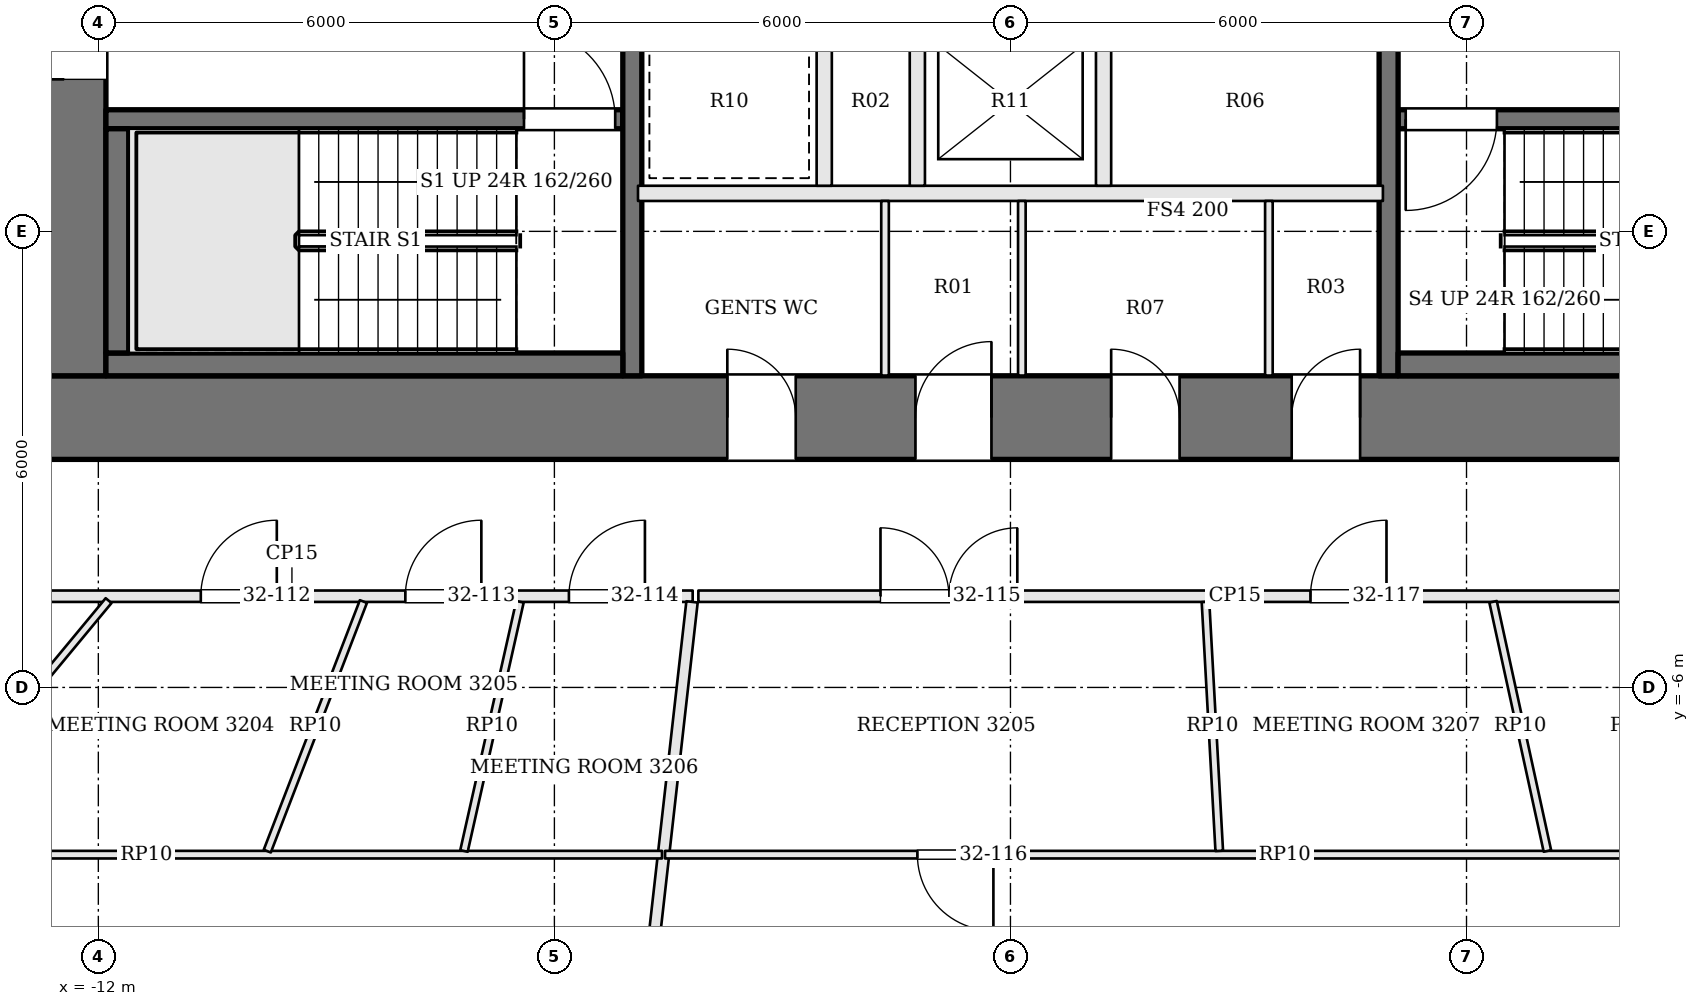
"""IFC4 building model, lengths in metres.
Left out: names, types, materials, properties, quantities, classifications, styles, units other than length and angle.
Written with IfcOpenShell. Run it as: python <this file> out.ifc"""

import sys

from ifc_helpers import new_model, si_unit, direction, frame, frame_2d, origin, place, context, subcontext, project, spatial, rectangle, extrude, element, fill, save


model = new_model("IFC4")
c1 = context("Model", 3, precision=1e-05, world=origin(), true_north=direction((0.0, 1.0)))
c2 = subcontext(c1, "Body", "Model", "MODEL_VIEW")
j1 = project(units=[si_unit("LENGTHUNIT", "METRE"), si_unit("PLANEANGLEUNIT", "RADIAN")], contexts=[c1])
p1 = place(None, origin())
s1 = spatial("IfcSite", under=j1, at=p1, CompositionType="ELEMENT")
p2 = place(p1, origin())
s2 = spatial("IfcBuilding", under=s1, at=p2, CompositionType="ELEMENT")
p3 = place(p2, frame((0.0, 0.0, 134.4)))
s3 = spatial("IfcBuildingStorey", under=s2, at=p3, CompositionType="ELEMENT", Elevation=134.4)
p4 = place(p3, frame((-13.0, -2.45, 0.0), z_axis=(0.0, 0.0, 1.0), x_axis=(1.0, 0.0, 0.0)))
e1 = element("IfcWall", 1, at=p4, inside=s3, PredefinedType="SHEAR", context=c2, shape_type="SweptSolid", body=[
    extrude(rectangle(XDim=26.0, YDim=1.1, at=frame_2d((13.0, 0.0))), origin(), (0.0, 0.0, 1.0), 3.9),
])
p5 = place(p4, frame((9.275, 0.0, 0.0)))
e2 = element("IfcOpeningElement", 2, at=p5, cuts=e1, PredefinedType="OPENING", context=c2, shape_type="SweptSolid", body=[
    extrude(rectangle(XDim=0.9, YDim=2.1, at=frame_2d((0.45, 1.05))), frame((0.0, 0.56, 0.0), z_axis=(0.0, -1.0, 0.0), x_axis=(1.0, 0.0, 0.0)), (0.0, 0.0, 1.0), 1.12),
])
p6 = place(p4, frame((11.75, 0.0, 0.0)))
e3 = element("IfcOpeningElement", 3, at=p6, cuts=e1, PredefinedType="OPENING", context=c2, shape_type="SweptSolid", body=[
    extrude(rectangle(XDim=1.0, YDim=2.1, at=frame_2d((0.5, 1.05))), frame((0.0, 0.56, 0.0), z_axis=(0.0, -1.0, 0.0), x_axis=(1.0, 0.0, 0.0)), (0.0, 0.0, 1.0), 1.12),
])
p7 = place(p4, frame((14.325, 0.0, 0.0)))
e4 = element("IfcOpeningElement", 4, at=p7, cuts=e1, PredefinedType="OPENING", context=c2, shape_type="SweptSolid", body=[
    extrude(rectangle(XDim=0.9, YDim=2.1, at=frame_2d((0.45, 1.05))), frame((0.0, 0.56, 0.0), z_axis=(0.0, -1.0, 0.0), x_axis=(1.0, 0.0, 0.0)), (0.0, 0.0, 1.0), 1.12),
])
p8 = place(p4, frame((16.7, 0.0, 0.0)))
e5 = element("IfcOpeningElement", 5, at=p8, cuts=e1, PredefinedType="OPENING", context=c2, shape_type="SweptSolid", body=[
    extrude(rectangle(XDim=0.9, YDim=2.1, at=frame_2d((0.45, 1.05))), frame((0.0, 0.56, 0.0), z_axis=(0.0, -1.0, 0.0), x_axis=(1.0, 0.0, 0.0)), (0.0, 0.0, 1.0), 1.12),
])
p9 = place(p3, frame((-12.45, -1.9, 0.0), z_axis=(0.0, 0.0, 1.0), x_axis=(0.0, 1.0, 0.0)))
e6 = element("IfcWall", 6, at=p9, inside=s3, PredefinedType="SHEAR", context=c2, shape_type="SweptSolid", body=[
    extrude(rectangle(XDim=12.8, YDim=1.1, at=frame_2d((6.4, 0.0))), origin(), (0.0, 0.0, 1.0), 3.9),
])
p10 = place(p9, frame((3.9, 0.0, 0.0)))
e7 = element("IfcOpeningElement", 7, at=p10, cuts=e6, PredefinedType="OPENING", context=c2, shape_type="SweptSolid", body=[
    extrude(rectangle(XDim=1.8, YDim=2.1, at=frame_2d((0.9, 1.05))), frame((0.0, 0.56, 0.0), z_axis=(0.0, -1.0, 0.0), x_axis=(1.0, 0.0, 0.0)), (0.0, 0.0, 1.0), 1.12),
])
p11 = place(p3, frame((-11.9, 1.475, 0.0), z_axis=(0.0, 0.0, 1.0), x_axis=(1.0, 0.0, 0.0)))
e8 = element("IfcWall", 8, at=p11, inside=s3, PredefinedType="SOLIDWALL", context=c2, shape_type="SweptSolid", body=[
    extrude(rectangle(XDim=6.8, YDim=0.25, at=frame_2d((3.4, 0.0))), origin(), (0.0, 0.0, 1.0), 3.7),
])
p12 = place(p11, frame((5.5, 0.0, 0.0)))
e9 = element("IfcOpeningElement", 9, at=p12, cuts=e8, PredefinedType="OPENING", context=c2, shape_type="SweptSolid", body=[
    extrude(rectangle(XDim=1.2, YDim=2.1, at=frame_2d((0.6, 1.05))), frame((0.0, 0.135, 0.0), z_axis=(0.0, -1.0, 0.0), x_axis=(1.0, 0.0, 0.0)), (0.0, 0.0, 1.0), 0.27),
])
p13 = place(p3, frame((11.9, 1.475, 0.0), z_axis=(0.0, 0.0, 1.0), x_axis=(-1.0, 0.0, 0.0)))
e10 = element("IfcWall", 10, at=p13, inside=s3, PredefinedType="SOLIDWALL", context=c2, shape_type="SweptSolid", body=[
    extrude(rectangle(XDim=6.8, YDim=0.25, at=frame_2d((3.4, 0.0))), origin(), (0.0, 0.0, 1.0), 3.7),
])
p14 = place(p13, frame((5.5, 0.0, 0.0)))
e11 = element("IfcOpeningElement", 11, at=p14, cuts=e10, PredefinedType="OPENING", context=c2, shape_type="SweptSolid", body=[
    extrude(rectangle(XDim=1.2, YDim=2.1, at=frame_2d((0.6, 1.05))), frame((0.0, 0.135, 0.0), z_axis=(0.0, -1.0, 0.0), x_axis=(1.0, 0.0, 0.0)), (0.0, 0.0, 1.0), 0.27),
])
p15 = place(p3, frame((-4.975, -1.9, 0.0), z_axis=(0.0, 0.0, 1.0), x_axis=(0.0, 1.0, 0.0)))
e12 = element("IfcWall", 12, at=p15, inside=s3, PredefinedType="SOLIDWALL", context=c2, shape_type="SweptSolid", body=[
    extrude(rectangle(XDim=12.8, YDim=0.25, at=frame_2d((6.4, 0.0))), origin(), (0.0, 0.0, 1.0), 3.7),
])
p16 = place(p15, frame((4.95, 0.0, 0.0)))
e13 = element("IfcOpeningElement", 13, at=p16, cuts=e12, PredefinedType="OPENING", context=c2, shape_type="SweptSolid", body=[
    extrude(rectangle(XDim=1.2, YDim=2.1, at=frame_2d((0.6, 1.05))), frame((0.0, 0.135, 0.0), z_axis=(0.0, -1.0, 0.0), x_axis=(1.0, 0.0, 0.0)), (0.0, 0.0, 1.0), 0.27),
])
p17 = place(p3, frame((4.975, 10.9, 0.0), z_axis=(0.0, 0.0, 1.0), x_axis=(0.0, -1.0, 0.0)))
e14 = element("IfcWall", 14, at=p17, inside=s3, PredefinedType="SOLIDWALL", context=c2, shape_type="SweptSolid", body=[
    extrude(rectangle(XDim=12.8, YDim=0.25, at=frame_2d((6.4, 0.0))), origin(), (0.0, 0.0, 1.0), 3.7),
])
p18 = place(p17, frame((4.95, 0.0, 0.0)))
e15 = element("IfcOpeningElement", 15, at=p18, cuts=e14, PredefinedType="OPENING", context=c2, shape_type="SweptSolid", body=[
    extrude(rectangle(XDim=1.2, YDim=2.1, at=frame_2d((0.6, 1.05))), frame((0.0, 0.135, 0.0), z_axis=(0.0, -1.0, 0.0), x_axis=(1.0, 0.0, 0.0)), (0.0, 0.0, 1.0), 0.27),
])
p19 = place(p3, frame((-11.9, -1.75, 0.0), z_axis=(0.0, 0.0, 1.0), x_axis=(1.0, 0.0, 0.0)))
e16 = element("IfcWall", 16, at=p19, inside=s3, PredefinedType="SOLIDWALL", context=c2, shape_type="SweptSolid", body=[
    extrude(rectangle(XDim=6.8, YDim=0.3, at=frame_2d((3.4, 0.0))), origin(), (0.0, 0.0, 1.0), 3.7),
])
p20 = place(p3, frame((-11.75, -1.6, 0.0), z_axis=(0.0, 0.0, 1.0), x_axis=(0.0, 1.0, 0.0)))
e17 = element("IfcWall", 17, at=p20, inside=s3, PredefinedType="SOLIDWALL", context=c2, shape_type="SweptSolid", body=[
    extrude(rectangle(XDim=2.95, YDim=0.3, at=frame_2d((1.475, 0.0))), origin(), (0.0, 0.0, 1.0), 3.7),
])
p21 = place(p3, frame((11.9, -1.75, 0.0), z_axis=(0.0, 0.0, 1.0), x_axis=(-1.0, 0.0, 0.0)))
e18 = element("IfcWall", 18, at=p21, inside=s3, PredefinedType="SOLIDWALL", context=c2, shape_type="SweptSolid", body=[
    extrude(rectangle(XDim=6.8, YDim=0.3, at=frame_2d((3.4, 0.0))), origin(), (0.0, 0.0, 1.0), 3.7),
])
p22 = place(p3, frame((-4.9, 0.5, 0.0), z_axis=(0.0, 0.0, 1.0), x_axis=(1.0, 0.0, 0.0)))
e19 = element("IfcWall", 19, at=p22, inside=s3, PredefinedType="SOLIDWALL", context=c2, shape_type="SweptSolid", body=[
    extrude(rectangle(XDim=9.8, YDim=0.2, at=frame_2d((4.9, 0.0))), origin(), (0.0, 0.0, 1.0), 3.7),
])
for number, where, z_axis, x_axis in (
    (20, (-2.45, 0.6, 0.0), (0.0, 0.0, 1.0), (0.0, 1.0, 0.0)),
    (21, (-1.225, 0.6, 0.0), (0.0, 0.0, 1.0), (0.0, 1.0, 0.0)),
    (22, (1.225, 0.6, 0.0), (0.0, 0.0, 1.0), (0.0, 1.0, 0.0)),
):
    element("IfcWall", number, at=place(p3, frame(where, z_axis=z_axis, x_axis=x_axis)), inside=s3, PredefinedType="SOLIDWALL", context=c2, shape_type="SweptSolid", body=[
        extrude(rectangle(XDim=2.2, YDim=0.2, at=frame_2d((1.1, 0.0))), origin(), (0.0, 0.0, 1.0), 3.7),
    ])
for number, where, z_axis, x_axis in (
    (23, (-1.65, -1.9, 0.0), (0.0, 0.0, 1.0), (0.0, 1.0, 0.0)),
    (24, (0.15, -1.9, 0.0), (0.0, 0.0, 1.0), (0.0, 1.0, 0.0)),
    (25, (3.4, -1.9, 0.0), (0.0, 0.0, 1.0), (0.0, 1.0, 0.0)),
):
    element("IfcWall", number, at=place(p3, frame(where, z_axis=z_axis, x_axis=x_axis)), inside=s3, PredefinedType="PARTITIONING", context=c2, shape_type="SweptSolid", body=[
        extrude(rectangle(XDim=2.3, YDim=0.1, at=frame_2d((1.15, 0.0))), origin(), (0.0, 0.0, 1.0), 3.7),
    ])
p23 = place(p3, frame((-14.725, -4.8, 0.0), z_axis=(0.0, 0.0, 1.0), x_axis=(1.0, 0.0, 0.0)))
e26 = element("IfcWall", 26, at=p23, inside=s3, PredefinedType="PARTITIONING", context=c2, shape_type="SweptSolid", body=[
    extrude(rectangle(XDim=10.544, YDim=0.15, at=frame_2d((5.272, 0.0))), origin(), (0.0, 0.0, 1.0), 3.198),
])
p24 = place(p23, frame((0.45, 0.0, 0.0)))
e27 = element("IfcOpeningElement", 27, at=p24, cuts=e26, PredefinedType="OPENING", context=c2, shape_type="SweptSolid", body=[
    extrude(rectangle(XDim=1.0, YDim=2.1, at=frame_2d((0.5, 1.05))), frame((0.0, 0.085, 0.0), z_axis=(0.0, -1.0, 0.0), x_axis=(1.0, 0.0, 0.0)), (0.0, 0.0, 1.0), 0.17),
])
p25 = place(p23, frame((4.073, 0.0, 0.0)))
e28 = element("IfcOpeningElement", 28, at=p25, cuts=e26, PredefinedType="OPENING", context=c2, shape_type="SweptSolid", body=[
    extrude(rectangle(XDim=1.0, YDim=2.4, at=frame_2d((0.5, 1.2))), frame((0.0, 0.085, 0.0), z_axis=(0.0, -1.0, 0.0), x_axis=(1.0, 0.0, 0.0)), (0.0, 0.0, 1.0), 0.17),
])
p26 = place(p23, frame((6.764, 0.0, 0.0)))
e29 = element("IfcOpeningElement", 29, at=p26, cuts=e26, PredefinedType="OPENING", context=c2, shape_type="SweptSolid", body=[
    extrude(rectangle(XDim=1.0, YDim=2.4, at=frame_2d((0.5, 1.2))), frame((0.0, 0.085, 0.0), z_axis=(0.0, -1.0, 0.0), x_axis=(1.0, 0.0, 0.0)), (0.0, 0.0, 1.0), 0.17),
])
p27 = place(p23, frame((8.916, 0.0, 0.0)))
e30 = element("IfcOpeningElement", 30, at=p27, cuts=e26, PredefinedType="OPENING", context=c2, shape_type="SweptSolid", body=[
    extrude(rectangle(XDim=1.0, YDim=2.4, at=frame_2d((0.5, 1.2))), frame((0.0, 0.085, 0.0), z_axis=(0.0, -1.0, 0.0), x_axis=(1.0, 0.0, 0.0)), (0.0, 0.0, 1.0), 0.17),
])
p28 = place(p3, frame((-5.59, -17.294, 0.0), z_axis=(0.0, 0.0, 1.0), x_axis=(0.112047950982, 0.993702800983, 0.0)))
e31 = element("IfcWall", 31, at=p28, inside=s3, PredefinedType="PARTITIONING", context=c2, shape_type="SweptSolid", body=[
    extrude(rectangle(XDim=12.498, YDim=0.15, at=frame_2d((6.249, 0.0))), origin(), (0.0, 0.0, 1.0), 3.198),
])
p29 = place(p3, frame((-4.106, -4.8, 0.0), z_axis=(0.0, 0.0, 1.0), x_axis=(1.0, 0.0, 0.0)))
e32 = element("IfcWall", 32, at=p29, inside=s3, PredefinedType="PARTITIONING", context=c2, shape_type="SweptSolid", body=[
    extrude(rectangle(XDim=14.117, YDim=0.15, at=frame_2d((7.059, 0.0))), origin(), (0.0, 0.0, 1.0), 3.198),
])
p30 = place(p29, frame((2.396, 0.0, 0.0)))
e33 = element("IfcOpeningElement", 33, at=p30, cuts=e32, PredefinedType="OPENING", context=c2, shape_type="SweptSolid", body=[
    extrude(rectangle(XDim=1.8, YDim=2.1, at=frame_2d((0.9, 1.05))), frame((0.0, 0.085, 0.0), z_axis=(0.0, -1.0, 0.0), x_axis=(1.0, 0.0, 0.0)), (0.0, 0.0, 1.0), 0.17),
])
p31 = place(p29, frame((8.053, 0.0, 0.0)))
e34 = element("IfcOpeningElement", 34, at=p31, cuts=e32, PredefinedType="OPENING", context=c2, shape_type="SweptSolid", body=[
    extrude(rectangle(XDim=1.0, YDim=2.4, at=frame_2d((0.5, 1.2))), frame((0.0, 0.085, 0.0), z_axis=(0.0, -1.0, 0.0), x_axis=(1.0, 0.0, 0.0)), (0.0, 0.0, 1.0), 0.17),
])
p32 = place(p3, frame((-4.584, -8.2, 0.0), z_axis=(0.0, 0.0, 1.0), x_axis=(-1.0, 0.0, 0.0)))
e35 = element("IfcWall", 35, at=p32, inside=s3, PredefinedType="PARTITIONING", context=c2, shape_type="SweptSolid", body=[
    extrude(rectangle(XDim=13.566, YDim=0.1, at=frame_2d((6.783, 0.0))), origin(), (0.0, 0.0, 1.0), 3.184),
])
p33 = place(p3, frame((-11.865, -4.858, 0.0), z_axis=(0.0, 0.0, 1.0), x_axis=(-0.638010152626, -0.770027950886, 0.0)))
e36 = element("IfcWall", 36, at=p33, inside=s3, PredefinedType="PARTITIONING", context=c2, shape_type="SweptSolid", body=[
    extrude(rectangle(XDim=4.29, YDim=0.1, at=frame_2d((2.145, 0.0))), origin(), (0.0, 0.0, 1.0), 3.184),
])
p34 = place(p3, frame((-8.513, -4.87, 0.0), z_axis=(0.0, 0.0, 1.0), x_axis=(-0.359444024243, -0.933166648266, 0.0)))
e37 = element("IfcWall", 37, at=p34, inside=s3, PredefinedType="PARTITIONING", context=c2, shape_type="SweptSolid", body=[
    extrude(rectangle(XDim=3.518, YDim=0.1, at=frame_2d((1.759, 0.0))), origin(), (0.0, 0.0, 1.0), 3.184),
])
p35 = place(p3, frame((-6.453, -4.873, 0.0), z_axis=(0.0, 0.0, 1.0), x_axis=(-0.21917670953, -0.975685179758, 0.0)))
e38 = element("IfcWall", 38, at=p35, inside=s3, PredefinedType="PARTITIONING", context=c2, shape_type="SweptSolid", body=[
    extrude(rectangle(XDim=3.36, YDim=0.1, at=frame_2d((1.68, 0.0))), origin(), (0.0, 0.0, 1.0), 3.184),
])
p36 = place(p3, frame((11.76, -8.2, 0.0), z_axis=(0.0, 0.0, 1.0), x_axis=(-1.0, 0.0, 0.0)))
e39 = element("IfcWall", 39, at=p36, inside=s3, PredefinedType="PARTITIONING", context=c2, shape_type="SweptSolid", body=[
    extrude(rectangle(XDim=16.305, YDim=0.1, at=frame_2d((8.152, 0.0))), origin(), (0.0, 0.0, 1.0), 3.184),
])
p37 = place(p36, frame((11.985, 0.0, 0.0)))
e40 = element("IfcOpeningElement", 40, at=p37, cuts=e39, PredefinedType="OPENING", context=c2, shape_type="SweptSolid", body=[
    extrude(rectangle(XDim=1.0, YDim=2.1, at=frame_2d((0.5, 1.05))), frame((0.0, 0.06, 0.0), z_axis=(0.0, -1.0, 0.0), x_axis=(1.0, 0.0, 0.0)), (0.0, 0.0, 1.0), 0.12),
])
p38 = place(p36, frame((1.674, 0.0, 0.0)))
e41 = element("IfcOpeningElement", 41, at=p38, cuts=e39, PredefinedType="OPENING", context=c2, shape_type="SweptSolid", body=[
    extrude(rectangle(XDim=0.9, YDim=2.1, at=frame_2d((0.45, 1.05))), frame((0.0, 0.06, 0.0), z_axis=(0.0, -1.0, 0.0), x_axis=(1.0, 0.0, 0.0)), (0.0, 0.0, 1.0), 0.12),
])
p39 = place(p3, frame((2.566, -4.875, 0.0), z_axis=(0.0, 0.0, 1.0), x_axis=(0.05515260166, -0.998477936927, 0.0)))
e42 = element("IfcWall", 42, at=p39, inside=s3, PredefinedType="PARTITIONING", context=c2, shape_type="SweptSolid", body=[
    extrude(rectangle(XDim=3.28, YDim=0.1, at=frame_2d((1.64, 0.0))), origin(), (0.0, 0.0, 1.0), 3.184),
])
p40 = place(p3, frame((6.35, -4.873, 0.0), z_axis=(0.0, 0.0, 1.0), x_axis=(0.213006668545, -0.977050745435, 0.0)))
e43 = element("IfcWall", 43, at=p40, inside=s3, PredefinedType="PARTITIONING", context=c2, shape_type="SweptSolid", body=[
    extrude(rectangle(XDim=3.355, YDim=0.1, at=frame_2d((1.677, 0.0))), origin(), (0.0, 0.0, 1.0), 3.184),
])
p41 = place(p10, origin())
e44 = element("IfcDoor", 44, at=p41, inside=s3, OperationType="DOUBLE_DOOR_SINGLE_SWING", PredefinedType="DOOR", context=c2, shape_type="SweptSolid", body=[
    extrude(rectangle(XDim=1.8, YDim=2.1, at=frame_2d((0.9, 1.05))), frame((0.0, 0.025, 0.0), z_axis=(0.0, -1.0, 0.0), x_axis=(1.0, 0.0, 0.0)), (0.0, 0.0, 1.0), 0.05),
])
fill(e7, e44)
p42 = place(p12, origin())
e45 = element("IfcDoor", 45, at=p42, inside=s3, OperationType="SINGLE_SWING_LEFT", PredefinedType="DOOR", context=c2, shape_type="SweptSolid", body=[
    extrude(rectangle(XDim=1.2, YDim=2.1, at=frame_2d((0.6, 1.05))), frame((0.0, 0.025, 0.0), z_axis=(0.0, -1.0, 0.0), x_axis=(1.0, 0.0, 0.0)), (0.0, 0.0, 1.0), 0.05),
])
fill(e9, e45)
p43 = place(p14, origin())
e46 = element("IfcDoor", 46, at=p43, inside=s3, OperationType="SINGLE_SWING_RIGHT", PredefinedType="DOOR", context=c2, shape_type="SweptSolid", body=[
    extrude(rectangle(XDim=1.2, YDim=2.1, at=frame_2d((0.6, 1.05))), frame((0.0, 0.025, 0.0), z_axis=(0.0, -1.0, 0.0), x_axis=(1.0, 0.0, 0.0)), (0.0, 0.0, 1.0), 0.05),
])
fill(e11, e46)
p44 = place(p5, origin())
e47 = element("IfcDoor", 47, at=p44, inside=s3, OperationType="SINGLE_SWING_LEFT", PredefinedType="DOOR", context=c2, shape_type="SweptSolid", body=[
    extrude(rectangle(XDim=0.9, YDim=2.1, at=frame_2d((0.45, 1.05))), frame((0.0, 0.025, 0.0), z_axis=(0.0, -1.0, 0.0), x_axis=(1.0, 0.0, 0.0)), (0.0, 0.0, 1.0), 0.05),
])
fill(e2, e47)
p45 = place(p6, origin())
e48 = element("IfcDoor", 48, at=p45, inside=s3, OperationType="SINGLE_SWING_RIGHT", PredefinedType="DOOR", context=c2, shape_type="SweptSolid", body=[
    extrude(rectangle(XDim=1.0, YDim=2.1, at=frame_2d((0.5, 1.05))), frame((0.0, 0.025, 0.0), z_axis=(0.0, -1.0, 0.0), x_axis=(1.0, 0.0, 0.0)), (0.0, 0.0, 1.0), 0.05),
])
fill(e3, e48)
p46 = place(p7, origin())
e49 = element("IfcDoor", 49, at=p46, inside=s3, OperationType="SINGLE_SWING_LEFT", PredefinedType="DOOR", context=c2, shape_type="SweptSolid", body=[
    extrude(rectangle(XDim=0.9, YDim=2.1, at=frame_2d((0.45, 1.05))), frame((0.0, 0.025, 0.0), z_axis=(0.0, -1.0, 0.0), x_axis=(1.0, 0.0, 0.0)), (0.0, 0.0, 1.0), 0.05),
])
fill(e4, e49)
p47 = place(p8, origin())
e50 = element("IfcDoor", 50, at=p47, inside=s3, OperationType="SINGLE_SWING_RIGHT", PredefinedType="DOOR", context=c2, shape_type="SweptSolid", body=[
    extrude(rectangle(XDim=0.9, YDim=2.1, at=frame_2d((0.45, 1.05))), frame((0.0, 0.025, 0.0), z_axis=(0.0, -1.0, 0.0), x_axis=(1.0, 0.0, 0.0)), (0.0, 0.0, 1.0), 0.05),
])
fill(e5, e50)
p48 = place(p25, origin())
e51 = element("IfcDoor", 51, at=p48, inside=s3, OperationType="SINGLE_SWING_RIGHT", PredefinedType="DOOR", context=c2, shape_type="SweptSolid", body=[
    extrude(rectangle(XDim=1.0, YDim=2.4, at=frame_2d((0.5, 1.2))), frame((0.0, 0.025, 0.0), z_axis=(0.0, -1.0, 0.0), x_axis=(1.0, 0.0, 0.0)), (0.0, 0.0, 1.0), 0.05),
])
fill(e28, e51)
p49 = place(p26, origin())
e52 = element("IfcDoor", 52, at=p49, inside=s3, OperationType="SINGLE_SWING_RIGHT", PredefinedType="DOOR", context=c2, shape_type="SweptSolid", body=[
    extrude(rectangle(XDim=1.0, YDim=2.4, at=frame_2d((0.5, 1.2))), frame((0.0, 0.025, 0.0), z_axis=(0.0, -1.0, 0.0), x_axis=(1.0, 0.0, 0.0)), (0.0, 0.0, 1.0), 0.05),
])
fill(e29, e52)
p50 = place(p27, origin())
e53 = element("IfcDoor", 53, at=p50, inside=s3, OperationType="SINGLE_SWING_RIGHT", PredefinedType="DOOR", context=c2, shape_type="SweptSolid", body=[
    extrude(rectangle(XDim=1.0, YDim=2.4, at=frame_2d((0.5, 1.2))), frame((0.0, 0.025, 0.0), z_axis=(0.0, -1.0, 0.0), x_axis=(1.0, 0.0, 0.0)), (0.0, 0.0, 1.0), 0.05),
])
fill(e30, e53)
p51 = place(p30, origin())
e54 = element("IfcDoor", 54, at=p51, inside=s3, OperationType="DOUBLE_DOOR_SINGLE_SWING", PredefinedType="DOOR", context=c2, shape_type="SweptSolid", body=[
    extrude(rectangle(XDim=1.8, YDim=2.1, at=frame_2d((0.9, 1.05))), frame((0.0, 0.025, 0.0), z_axis=(0.0, -1.0, 0.0), x_axis=(1.0, 0.0, 0.0)), (0.0, 0.0, 1.0), 0.05),
])
fill(e33, e54)
p52 = place(p37, origin())
e55 = element("IfcDoor", 55, at=p52, inside=s3, OperationType="SINGLE_SWING_LEFT", PredefinedType="DOOR", context=c2, shape_type="SweptSolid", body=[
    extrude(rectangle(XDim=1.0, YDim=2.1, at=frame_2d((0.5, 1.05))), frame((0.0, 0.025, 0.0), z_axis=(0.0, -1.0, 0.0), x_axis=(1.0, 0.0, 0.0)), (0.0, 0.0, 1.0), 0.05),
])
fill(e40, e55)
p53 = place(p31, origin())
e56 = element("IfcDoor", 56, at=p53, inside=s3, OperationType="SINGLE_SWING_RIGHT", PredefinedType="DOOR", context=c2, shape_type="SweptSolid", body=[
    extrude(rectangle(XDim=1.0, YDim=2.4, at=frame_2d((0.5, 1.2))), frame((0.0, 0.025, 0.0), z_axis=(0.0, -1.0, 0.0), x_axis=(1.0, 0.0, 0.0)), (0.0, 0.0, 1.0), 0.05),
])
fill(e34, e56)
save(model, sys.argv[1])
